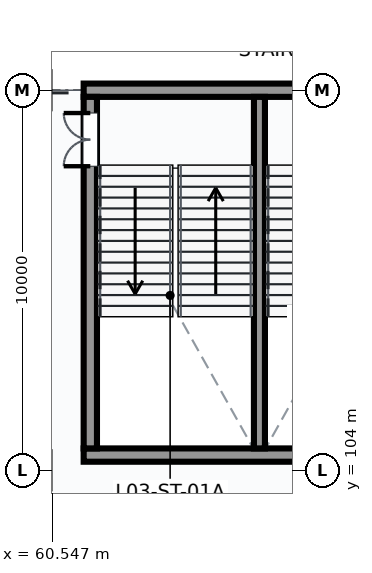
"""IFC4 building model, lengths in metres.
Left out: names, types, materials, properties, quantities, classifications, styles, units other than length and angle.
Written with IfcOpenShell. Run it as: python <this file> out.ifc"""

import sys

from ifc_helpers import new_model, si_unit, direction, frame, frame_2d, origin, place, context, subcontext, project, spatial, rectangle, extrude, element, fill, save


model = new_model("IFC4")
c1 = context("Model", 3, precision=1e-05, world=origin(), true_north=direction((0.0, 1.0)))
c2 = subcontext(c1, "Body", "Model", "MODEL_VIEW")
j1 = project(units=[si_unit("LENGTHUNIT", "METRE"), si_unit("PLANEANGLEUNIT", "RADIAN")], contexts=[c1])
p1 = place(None, origin())
s1 = spatial("IfcSite", under=j1, at=p1, CompositionType="ELEMENT")
p2 = place(p1, origin())
s2 = spatial("IfcBuilding", under=s1, at=p2, CompositionType="ELEMENT")
p3 = place(p2, frame((0.0, 0.0, 14.7)))
s3 = spatial("IfcBuildingStorey", under=s2, at=p3, CompositionType="ELEMENT", Elevation=14.7)
p4 = place(p3, frame((61.375, 104.4, 0.0), z_axis=(0.0, 0.0, 1.0), x_axis=(1.0, 0.0, 0.0)))
e1 = element("IfcWall", 1, at=p4, inside=s3, PredefinedType="SHEAR", context=c2, shape_type="SweptSolid", body=[
    extrude(rectangle(XDim=9.25, YDim=0.35, at=frame_2d((4.625, 0.0))), origin(), (0.0, 0.0, 1.0), 4.5),
])
p5 = place(p3, frame((61.375, 114.0, 0.0), z_axis=(0.0, 0.0, 1.0), x_axis=(1.0, 0.0, 0.0)))
e2 = element("IfcWall", 2, at=p5, inside=s3, PredefinedType="SHEAR", context=c2, shape_type="SweptSolid", body=[
    extrude(rectangle(XDim=9.25, YDim=0.35, at=frame_2d((4.625, 0.0))), origin(), (0.0, 0.0, 1.0), 3.596),
])
p6 = place(p3, frame((61.55, 104.575, 0.0), z_axis=(0.0, 0.0, 1.0), x_axis=(0.0, 1.0, 0.0)))
e3 = element("IfcWall", 3, at=p6, inside=s3, PredefinedType="SHEAR", context=c2, shape_type="SweptSolid", body=[
    extrude(rectangle(XDim=9.25, YDim=0.35, at=frame_2d((4.625, 0.0))), origin(), (0.0, 0.0, 1.0), 4.5),
])
p7 = place(p6, frame((7.425, 0.0, 0.0)))
e4 = element("IfcOpeningElement", 4, at=p7, cuts=e3, PredefinedType="OPENING", context=c2, shape_type="SweptSolid", body=[
    extrude(rectangle(XDim=1.4, YDim=2.2, at=frame_2d((0.7, 1.1))), frame((0.0, 0.185, 0.0), z_axis=(0.0, -1.0, 0.0), x_axis=(1.0, 0.0, 0.0)), (0.0, 0.0, 1.0), 0.37),
])
p8 = place(p3, frame((66.0, 104.575, 0.0), z_axis=(0.0, 0.0, 1.0), x_axis=(0.0, 1.0, 0.0)))
e5 = element("IfcWall", 5, at=p8, inside=s3, PredefinedType="SHEAR", context=c2, shape_type="SweptSolid", body=[
    extrude(rectangle(XDim=9.25, YDim=0.29, at=frame_2d((4.625, 0.0))), origin(), (0.0, 0.0, 1.0), 4.5),
])
p9 = place(p7, frame((1.4, 0.0, 0.0), z_axis=(0.0, 0.0, 1.0), x_axis=(-1.0, 0.0, 0.0)))
e6 = element("IfcDoor", 6, at=p9, inside=s3, OperationType="DOUBLE_DOOR_SINGLE_SWING", PredefinedType="DOOR", context=c2, shape_type="SweptSolid", body=[
    extrude(rectangle(XDim=1.4, YDim=2.2, at=frame_2d((0.7, 1.1))), frame((0.0, 0.025, 0.0), z_axis=(0.0, -1.0, 0.0), x_axis=(1.0, 0.0, 0.0)), (0.0, 0.0, 1.0), 0.05),
])
fill(e4, e6)
save(model, sys.argv[1])
